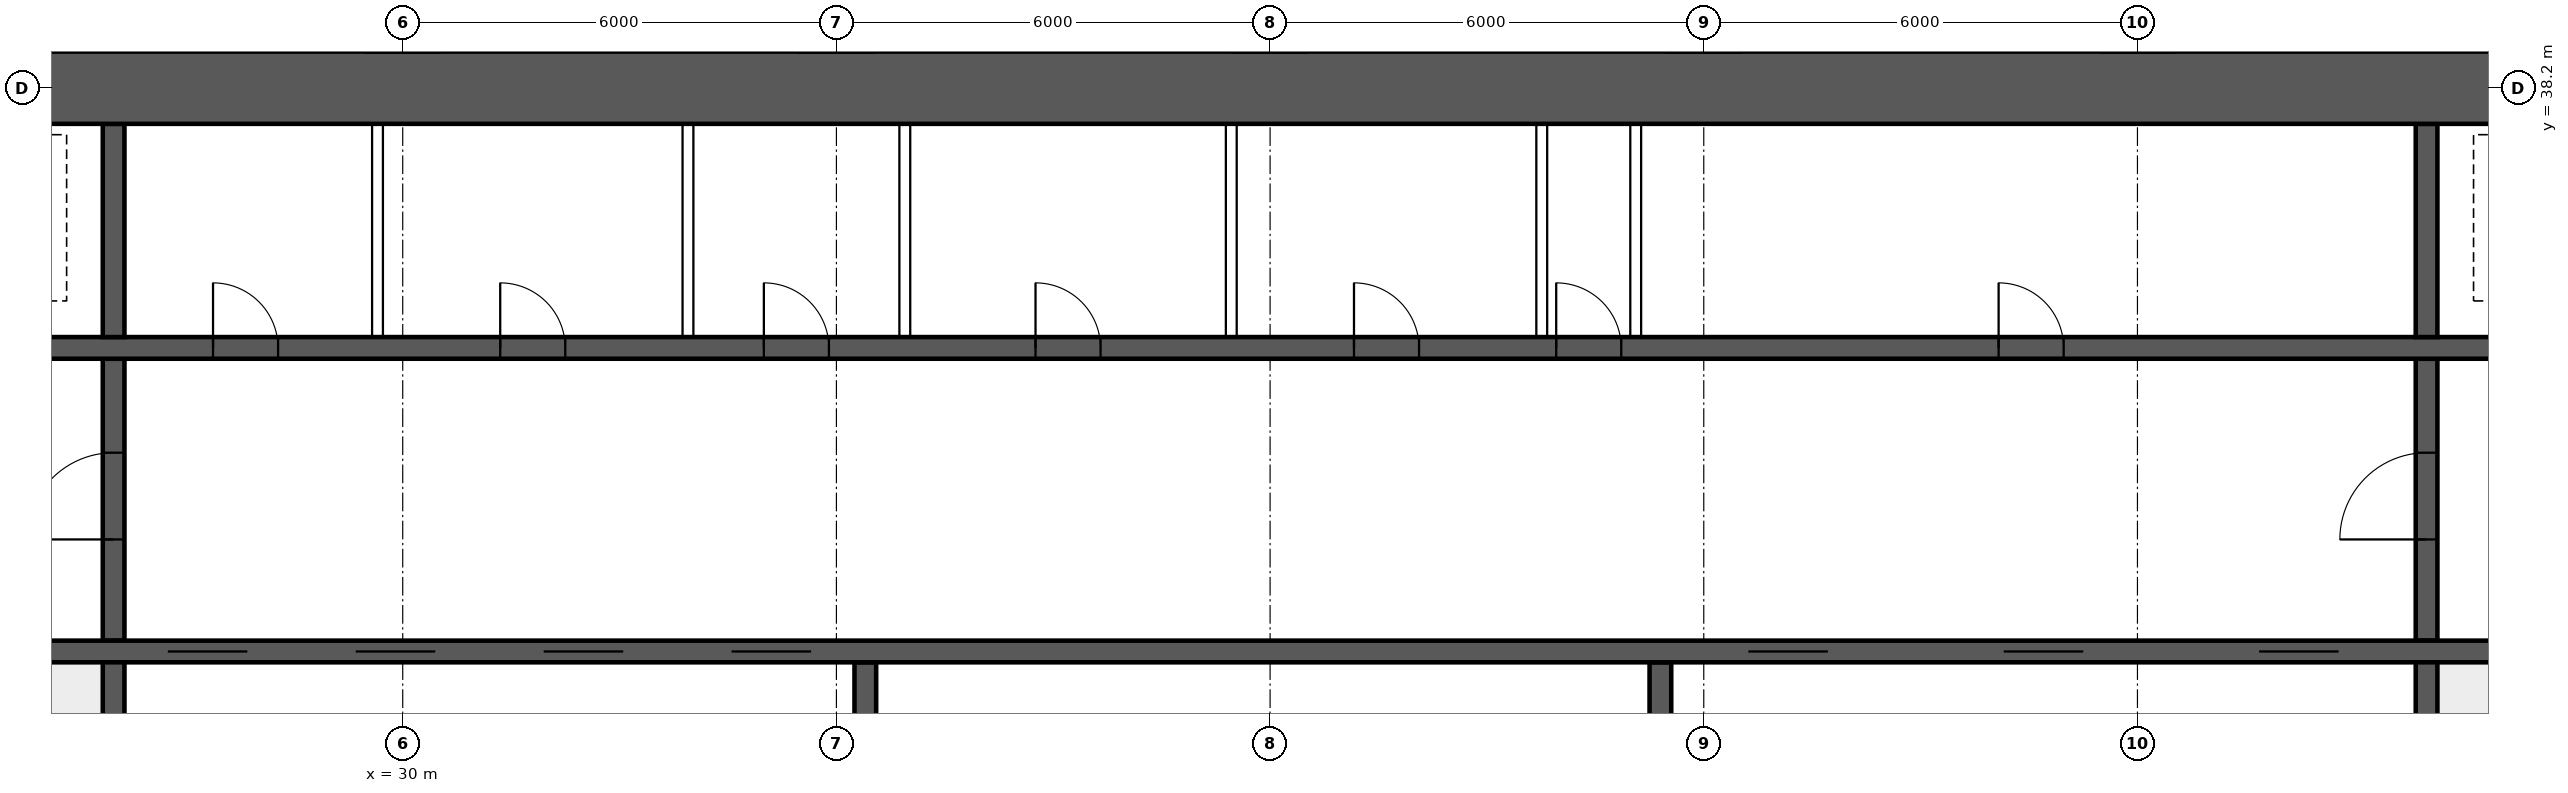
"""IFC4 building model, lengths in metres.
Left out: names, types, materials, properties, quantities, classifications, styles, units other than length and angle.
Written with IfcOpenShell. Run it as: python <this file> out.ifc"""

import sys

from ifc_helpers import new_model, si_unit, direction, frame, frame_2d, origin, place, context, subcontext, project, spatial, rectangle, extrude, element, fill, save


model = new_model("IFC4")
c1 = context("Model", 3, precision=1e-05, world=origin(), true_north=direction((0.0, 1.0)))
c2 = subcontext(c1, "Body", "Model", "MODEL_VIEW")
j1 = project(units=[si_unit("LENGTHUNIT", "METRE"), si_unit("PLANEANGLEUNIT", "RADIAN")], contexts=[c1])
p1 = place(None, origin())
s1 = spatial("IfcSite", under=j1, at=p1, CompositionType="ELEMENT")
p2 = place(p1, origin())
s2 = spatial("IfcBuilding", under=s1, at=p2, CompositionType="ELEMENT")
p3 = place(p2, frame((0.0, 0.0, 35.2)))
s3 = spatial("IfcBuildingStorey", under=s2, at=p3, CompositionType="ELEMENT", Elevation=35.2)
p4 = place(p3, frame((18.0, 38.2, 0.0), z_axis=(0.0, 0.0, 1.0), x_axis=(1.0, 0.0, 0.0)))
e1 = element("IfcWall", 1, at=p4, inside=s3, PredefinedType="SHEAR", context=c2, shape_type="SweptSolid", body=[
    extrude(rectangle(XDim=48.0, YDim=1.0, at=frame_2d((24.0, 0.0))), origin(), (0.0, 0.0, 1.0), 3.75),
])
p5 = place(p3, frame((18.5, 30.4, 0.0), z_axis=(0.0, 0.0, 1.0), x_axis=(1.0, 0.0, 0.0)))
e2 = element("IfcWall", 2, at=p5, inside=s3, PredefinedType="SHEAR", context=c2, shape_type="SweptSolid", body=[
    extrude(rectangle(XDim=47.0, YDim=0.3, at=frame_2d((23.5, 0.0))), origin(), (0.0, 0.0, 1.0), 3.75),
])
p6 = place(p5, frame((0.4, 0.0, 0.0)))
e3 = element("IfcOpeningElement", 3, at=p6, cuts=e2, PredefinedType="OPENING", context=c2, shape_type="SweptSolid", body=[
    extrude(rectangle(XDim=1.0, YDim=2.1, at=frame_2d((0.5, 1.05))), frame((0.0, 0.16, 0.0), z_axis=(0.0, -1.0, 0.0), x_axis=(1.0, 0.0, 0.0)), (0.0, 0.0, 1.0), 0.32),
])
p7 = place(p5, frame((45.6, 0.0, 0.0)))
e4 = element("IfcOpeningElement", 4, at=p7, cuts=e2, PredefinedType="OPENING", context=c2, shape_type="SweptSolid", body=[
    extrude(rectangle(XDim=1.0, YDim=2.1, at=frame_2d((0.5, 1.05))), frame((0.0, 0.16, 0.0), z_axis=(0.0, -1.0, 0.0), x_axis=(1.0, 0.0, 0.0)), (0.0, 0.0, 1.0), 0.32),
])
p8 = place(p5, frame((8.25, 0.0, 0.0)))
e5 = element("IfcOpeningElement", 5, at=p8, cuts=e2, PredefinedType="OPENING", context=c2, shape_type="SweptSolid", body=[
    extrude(rectangle(XDim=1.1, YDim=2.1, at=frame_2d((0.55, 1.05))), frame((0.0, 0.16, 0.0), z_axis=(0.0, -1.0, 0.0), x_axis=(1.0, 0.0, 0.0)), (0.0, 0.0, 1.0), 0.32),
])
p9 = place(p5, frame((10.85, 0.0, 0.0)))
e6 = element("IfcOpeningElement", 6, at=p9, cuts=e2, PredefinedType="OPENING", context=c2, shape_type="SweptSolid", body=[
    extrude(rectangle(XDim=1.1, YDim=2.1, at=frame_2d((0.55, 1.05))), frame((0.0, 0.16, 0.0), z_axis=(0.0, -1.0, 0.0), x_axis=(1.0, 0.0, 0.0)), (0.0, 0.0, 1.0), 0.32),
])
p10 = place(p5, frame((13.45, 0.0, 0.0)))
e7 = element("IfcOpeningElement", 7, at=p10, cuts=e2, PredefinedType="OPENING", context=c2, shape_type="SweptSolid", body=[
    extrude(rectangle(XDim=1.1, YDim=2.1, at=frame_2d((0.55, 1.05))), frame((0.0, 0.16, 0.0), z_axis=(0.0, -1.0, 0.0), x_axis=(1.0, 0.0, 0.0)), (0.0, 0.0, 1.0), 0.32),
])
p11 = place(p5, frame((16.05, 0.0, 0.0)))
e8 = element("IfcOpeningElement", 8, at=p11, cuts=e2, PredefinedType="OPENING", context=c2, shape_type="SweptSolid", body=[
    extrude(rectangle(XDim=1.1, YDim=2.1, at=frame_2d((0.55, 1.05))), frame((0.0, 0.16, 0.0), z_axis=(0.0, -1.0, 0.0), x_axis=(1.0, 0.0, 0.0)), (0.0, 0.0, 1.0), 0.32),
])
p12 = place(p5, frame((30.117, 0.0, 0.0)))
e9 = element("IfcOpeningElement", 9, at=p12, cuts=e2, PredefinedType="OPENING", context=c2, shape_type="SweptSolid", body=[
    extrude(rectangle(XDim=1.1, YDim=2.1, at=frame_2d((0.55, 1.05))), frame((0.0, 0.16, 0.0), z_axis=(0.0, -1.0, 0.0), x_axis=(1.0, 0.0, 0.0)), (0.0, 0.0, 1.0), 0.32),
])
p13 = place(p5, frame((33.65, 0.0, 0.0)))
e10 = element("IfcOpeningElement", 10, at=p13, cuts=e2, PredefinedType="OPENING", context=c2, shape_type="SweptSolid", body=[
    extrude(rectangle(XDim=1.1, YDim=2.1, at=frame_2d((0.55, 1.05))), frame((0.0, 0.16, 0.0), z_axis=(0.0, -1.0, 0.0), x_axis=(1.0, 0.0, 0.0)), (0.0, 0.0, 1.0), 0.32),
])
p14 = place(p5, frame((37.183, 0.0, 0.0)))
e11 = element("IfcOpeningElement", 11, at=p14, cuts=e2, PredefinedType="OPENING", context=c2, shape_type="SweptSolid", body=[
    extrude(rectangle(XDim=1.1, YDim=2.1, at=frame_2d((0.55, 1.05))), frame((0.0, 0.16, 0.0), z_axis=(0.0, -1.0, 0.0), x_axis=(1.0, 0.0, 0.0)), (0.0, 0.0, 1.0), 0.32),
])
p15 = place(p3, frame((18.5, 34.6, 0.0), z_axis=(0.0, 0.0, 1.0), x_axis=(1.0, 0.0, 0.0)))
e12 = element("IfcWall", 12, at=p15, inside=s3, PredefinedType="SHEAR", context=c2, shape_type="SweptSolid", body=[
    extrude(rectangle(XDim=47.0, YDim=0.3, at=frame_2d((23.5, 0.0))), origin(), (0.0, 0.0, 1.0), 3.75),
])
p16 = place(p15, frame((0.9, 0.0, 0.0)))
e13 = element("IfcOpeningElement", 13, at=p16, cuts=e12, PredefinedType="OPENING", context=c2, shape_type="SweptSolid", body=[
    extrude(rectangle(XDim=1.1, YDim=2.1, at=frame_2d((0.55, 1.05))), frame((0.0, 0.16, 0.0), z_axis=(0.0, -1.0, 0.0), x_axis=(1.0, 0.0, 0.0)), (0.0, 0.0, 1.0), 0.32),
])
p17 = place(p15, frame((45.0, 0.0, 0.0)))
e14 = element("IfcOpeningElement", 14, at=p17, cuts=e12, PredefinedType="OPENING", context=c2, shape_type="SweptSolid", body=[
    extrude(rectangle(XDim=1.1, YDim=2.1, at=frame_2d((0.55, 1.05))), frame((0.0, 0.16, 0.0), z_axis=(0.0, -1.0, 0.0), x_axis=(1.0, 0.0, 0.0)), (0.0, 0.0, 1.0), 0.32),
])
p18 = place(p15, frame((4.1, 0.0, 0.0)))
e15 = element("IfcOpeningElement", 15, at=p18, cuts=e12, PredefinedType="OPENING", context=c2, shape_type="SweptSolid", body=[
    extrude(rectangle(XDim=0.9, YDim=2.1, at=frame_2d((0.45, 1.05))), frame((0.0, 0.16, 0.0), z_axis=(0.0, -1.0, 0.0), x_axis=(1.0, 0.0, 0.0)), (0.0, 0.0, 1.0), 0.32),
])
p19 = place(p15, frame((42.0, 0.0, 0.0)))
e16 = element("IfcOpeningElement", 16, at=p19, cuts=e12, PredefinedType="OPENING", context=c2, shape_type="SweptSolid", body=[
    extrude(rectangle(XDim=0.9, YDim=2.1, at=frame_2d((0.45, 1.05))), frame((0.0, 0.16, 0.0), z_axis=(0.0, -1.0, 0.0), x_axis=(1.0, 0.0, 0.0)), (0.0, 0.0, 1.0), 0.32),
])
p20 = place(p15, frame((8.875, 0.0, 0.0)))
e17 = element("IfcOpeningElement", 17, at=p20, cuts=e12, PredefinedType="OPENING", context=c2, shape_type="SweptSolid", body=[
    extrude(rectangle(XDim=0.9, YDim=2.1, at=frame_2d((0.45, 1.05))), frame((0.0, 0.16, 0.0), z_axis=(0.0, -1.0, 0.0), x_axis=(1.0, 0.0, 0.0)), (0.0, 0.0, 1.0), 0.32),
])
p21 = place(p15, frame((12.849, 0.0, 0.0)))
e18 = element("IfcOpeningElement", 18, at=p21, cuts=e12, PredefinedType="OPENING", context=c2, shape_type="SweptSolid", body=[
    extrude(rectangle(XDim=0.9, YDim=2.1, at=frame_2d((0.45, 1.05))), frame((0.0, 0.16, 0.0), z_axis=(0.0, -1.0, 0.0), x_axis=(1.0, 0.0, 0.0)), (0.0, 0.0, 1.0), 0.32),
])
p22 = place(p15, frame((16.496, 0.0, 0.0)))
e19 = element("IfcOpeningElement", 19, at=p22, cuts=e12, PredefinedType="OPENING", context=c2, shape_type="SweptSolid", body=[
    extrude(rectangle(XDim=0.9, YDim=2.1, at=frame_2d((0.45, 1.05))), frame((0.0, 0.16, 0.0), z_axis=(0.0, -1.0, 0.0), x_axis=(1.0, 0.0, 0.0)), (0.0, 0.0, 1.0), 0.32),
])
p23 = place(p15, frame((20.255, 0.0, 0.0)))
e20 = element("IfcOpeningElement", 20, at=p23, cuts=e12, PredefinedType="OPENING", context=c2, shape_type="SweptSolid", body=[
    extrude(rectangle(XDim=0.9, YDim=2.1, at=frame_2d((0.45, 1.05))), frame((0.0, 0.16, 0.0), z_axis=(0.0, -1.0, 0.0), x_axis=(1.0, 0.0, 0.0)), (0.0, 0.0, 1.0), 0.32),
])
p24 = place(p15, frame((24.661, 0.0, 0.0)))
e21 = element("IfcOpeningElement", 21, at=p24, cuts=e12, PredefinedType="OPENING", context=c2, shape_type="SweptSolid", body=[
    extrude(rectangle(XDim=0.9, YDim=2.1, at=frame_2d((0.45, 1.05))), frame((0.0, 0.16, 0.0), z_axis=(0.0, -1.0, 0.0), x_axis=(1.0, 0.0, 0.0)), (0.0, 0.0, 1.0), 0.32),
])
p25 = place(p15, frame((27.458, 0.0, 0.0)))
e22 = element("IfcOpeningElement", 22, at=p25, cuts=e12, PredefinedType="OPENING", context=c2, shape_type="SweptSolid", body=[
    extrude(rectangle(XDim=0.9, YDim=2.1, at=frame_2d((0.45, 1.05))), frame((0.0, 0.16, 0.0), z_axis=(0.0, -1.0, 0.0), x_axis=(1.0, 0.0, 0.0)), (0.0, 0.0, 1.0), 0.32),
])
p26 = place(p15, frame((33.579, 0.0, 0.0)))
e23 = element("IfcOpeningElement", 23, at=p26, cuts=e12, PredefinedType="OPENING", context=c2, shape_type="SweptSolid", body=[
    extrude(rectangle(XDim=0.9, YDim=2.1, at=frame_2d((0.45, 1.05))), frame((0.0, 0.16, 0.0), z_axis=(0.0, -1.0, 0.0), x_axis=(1.0, 0.0, 0.0)), (0.0, 0.0, 1.0), 0.32),
])
for number, where, z_axis, x_axis in (
    (24, (26.0, 26.3, 0.0), (0.0, 0.0, 1.0), (0.0, 1.0, 0.0)),
    (25, (58.0, 26.3, 0.0), (0.0, 0.0, 1.0), (0.0, 1.0, 0.0)),
):
    element("IfcWall", number, at=place(p3, frame(where, z_axis=z_axis, x_axis=x_axis)), inside=s3, PredefinedType="SHEAR", context=c2, shape_type="SweptSolid", body=[
        extrude(rectangle(XDim=3.95, YDim=0.3, at=frame_2d((1.975, 0.0))), origin(), (0.0, 0.0, 1.0), 3.75),
    ])
p27 = place(p3, frame((26.0, 30.55, 0.0), z_axis=(0.0, 0.0, 1.0), x_axis=(0.0, 1.0, 0.0)))
e26 = element("IfcWall", 26, at=p27, inside=s3, PredefinedType="SHEAR", context=c2, shape_type="SweptSolid", body=[
    extrude(rectangle(XDim=3.9, YDim=0.3, at=frame_2d((1.95, 0.0))), origin(), (0.0, 0.0, 1.0), 3.75),
])
p28 = place(p27, frame((1.4, 0.0, 0.0)))
e27 = element("IfcOpeningElement", 27, at=p28, cuts=e26, PredefinedType="OPENING", context=c2, shape_type="SweptSolid", body=[
    extrude(rectangle(XDim=1.2, YDim=2.1, at=frame_2d((0.6, 1.05))), frame((0.0, 0.16, 0.0), z_axis=(0.0, -1.0, 0.0), x_axis=(1.0, 0.0, 0.0)), (0.0, 0.0, 1.0), 0.32),
])
p29 = place(p3, frame((58.0, 30.55, 0.0), z_axis=(0.0, 0.0, 1.0), x_axis=(0.0, 1.0, 0.0)))
e28 = element("IfcWall", 28, at=p29, inside=s3, PredefinedType="SHEAR", context=c2, shape_type="SweptSolid", body=[
    extrude(rectangle(XDim=3.9, YDim=0.3, at=frame_2d((1.95, 0.0))), origin(), (0.0, 0.0, 1.0), 3.75),
])
p30 = place(p29, frame((1.4, 0.0, 0.0)))
e29 = element("IfcOpeningElement", 29, at=p30, cuts=e28, PredefinedType="OPENING", context=c2, shape_type="SweptSolid", body=[
    extrude(rectangle(XDim=1.2, YDim=2.1, at=frame_2d((0.6, 1.05))), frame((0.0, 0.16, 0.0), z_axis=(0.0, -1.0, 0.0), x_axis=(1.0, 0.0, 0.0)), (0.0, 0.0, 1.0), 0.32),
])
for number, where, z_axis, x_axis in (
    (30, (26.0, 34.75, 0.0), (0.0, 0.0, 1.0), (0.0, 1.0, 0.0)),
    (31, (58.0, 34.75, 0.0), (0.0, 0.0, 1.0), (0.0, 1.0, 0.0)),
):
    element("IfcWall", number, at=place(p3, frame(where, z_axis=z_axis, x_axis=x_axis)), inside=s3, PredefinedType="SHEAR", context=c2, shape_type="SweptSolid", body=[
        extrude(rectangle(XDim=2.95, YDim=0.3, at=frame_2d((1.475, 0.0))), origin(), (0.0, 0.0, 1.0), 3.75),
    ])
for number, where, z_axis, x_axis in (
    (32, (36.4, 26.3, 0.0), (0.0, 0.0, 1.0), (0.0, 1.0, 0.0)),
    (33, (47.4, 26.3, 0.0), (0.0, 0.0, 1.0), (0.0, 1.0, 0.0)),
):
    element("IfcWall", number, at=place(p3, frame(where, z_axis=z_axis, x_axis=x_axis)), inside=s3, PredefinedType="SHEAR", context=c2, shape_type="SweptSolid", body=[
        extrude(rectangle(XDim=3.95, YDim=0.3, at=frame_2d((1.975, 0.0))), origin(), (0.0, 0.0, 1.0), 3.75),
    ])
for number, where, z_axis, x_axis in (
    (34, (29.651, 34.75, 0.0), (0.0, 0.0, 1.0), (0.0, 1.0, 0.0)),
    (35, (33.946, 34.75, 0.0), (0.0, 0.0, 1.0), (0.0, 1.0, 0.0)),
    (36, (36.946, 34.75, 0.0), (0.0, 0.0, 1.0), (0.0, 1.0, 0.0)),
    (37, (41.463, 34.75, 0.0), (0.0, 0.0, 1.0), (0.0, 1.0, 0.0)),
    (38, (45.758, 34.75, 0.0), (0.0, 0.0, 1.0), (0.0, 1.0, 0.0)),
    (39, (47.058, 34.75, 0.0), (0.0, 0.0, 1.0), (0.0, 1.0, 0.0)),
):
    element("IfcWall", number, at=place(p3, frame(where, z_axis=z_axis, x_axis=x_axis)), inside=s3, PredefinedType="SOLIDWALL", context=c2, shape_type="SweptSolid", body=[
        extrude(rectangle(XDim=2.95, YDim=0.15, at=frame_2d((1.475, 0.0))), origin(), (0.0, 0.0, 1.0), 3.3),
    ])
p31 = place(p28, origin())
e40 = element("IfcDoor", 40, at=p31, inside=s3, OperationType="SINGLE_SWING_LEFT", PredefinedType="DOOR", context=c2, shape_type="SweptSolid", body=[
    extrude(rectangle(XDim=1.2, YDim=2.1, at=frame_2d((0.6, 1.05))), frame((0.0, 0.025, 0.0), z_axis=(0.0, -1.0, 0.0), x_axis=(1.0, 0.0, 0.0)), (0.0, 0.0, 1.0), 0.05),
])
fill(e27, e40)
p32 = place(p30, origin())
e41 = element("IfcDoor", 41, at=p32, inside=s3, OperationType="SINGLE_SWING_LEFT", PredefinedType="DOOR", context=c2, shape_type="SweptSolid", body=[
    extrude(rectangle(XDim=1.2, YDim=2.1, at=frame_2d((0.6, 1.05))), frame((0.0, 0.025, 0.0), z_axis=(0.0, -1.0, 0.0), x_axis=(1.0, 0.0, 0.0)), (0.0, 0.0, 1.0), 0.05),
])
fill(e29, e41)
p33 = place(p20, origin())
e42 = element("IfcDoor", 42, at=p33, inside=s3, OperationType="SINGLE_SWING_LEFT", PredefinedType="DOOR", context=c2, shape_type="SweptSolid", body=[
    extrude(rectangle(XDim=0.9, YDim=2.1, at=frame_2d((0.45, 1.05))), frame((0.0, 0.025, 0.0), z_axis=(0.0, -1.0, 0.0), x_axis=(1.0, 0.0, 0.0)), (0.0, 0.0, 1.0), 0.05),
])
fill(e17, e42)
p34 = place(p21, origin())
e43 = element("IfcDoor", 43, at=p34, inside=s3, OperationType="SINGLE_SWING_LEFT", PredefinedType="DOOR", context=c2, shape_type="SweptSolid", body=[
    extrude(rectangle(XDim=0.9, YDim=2.1, at=frame_2d((0.45, 1.05))), frame((0.0, 0.025, 0.0), z_axis=(0.0, -1.0, 0.0), x_axis=(1.0, 0.0, 0.0)), (0.0, 0.0, 1.0), 0.05),
])
fill(e18, e43)
p35 = place(p22, origin())
e44 = element("IfcDoor", 44, at=p35, inside=s3, OperationType="SINGLE_SWING_LEFT", PredefinedType="DOOR", context=c2, shape_type="SweptSolid", body=[
    extrude(rectangle(XDim=0.9, YDim=2.1, at=frame_2d((0.45, 1.05))), frame((0.0, 0.025, 0.0), z_axis=(0.0, -1.0, 0.0), x_axis=(1.0, 0.0, 0.0)), (0.0, 0.0, 1.0), 0.05),
])
fill(e19, e44)
p36 = place(p23, origin())
e45 = element("IfcDoor", 45, at=p36, inside=s3, OperationType="SINGLE_SWING_LEFT", PredefinedType="DOOR", context=c2, shape_type="SweptSolid", body=[
    extrude(rectangle(XDim=0.9, YDim=2.1, at=frame_2d((0.45, 1.05))), frame((0.0, 0.025, 0.0), z_axis=(0.0, -1.0, 0.0), x_axis=(1.0, 0.0, 0.0)), (0.0, 0.0, 1.0), 0.05),
])
fill(e20, e45)
p37 = place(p24, origin())
e46 = element("IfcDoor", 46, at=p37, inside=s3, OperationType="SINGLE_SWING_LEFT", PredefinedType="DOOR", context=c2, shape_type="SweptSolid", body=[
    extrude(rectangle(XDim=0.9, YDim=2.1, at=frame_2d((0.45, 1.05))), frame((0.0, 0.025, 0.0), z_axis=(0.0, -1.0, 0.0), x_axis=(1.0, 0.0, 0.0)), (0.0, 0.0, 1.0), 0.05),
])
fill(e21, e46)
p38 = place(p25, origin())
e47 = element("IfcDoor", 47, at=p38, inside=s3, OperationType="SINGLE_SWING_LEFT", PredefinedType="DOOR", context=c2, shape_type="SweptSolid", body=[
    extrude(rectangle(XDim=0.9, YDim=2.1, at=frame_2d((0.45, 1.05))), frame((0.0, 0.025, 0.0), z_axis=(0.0, -1.0, 0.0), x_axis=(1.0, 0.0, 0.0)), (0.0, 0.0, 1.0), 0.05),
])
fill(e22, e47)
p39 = place(p26, origin())
e48 = element("IfcDoor", 48, at=p39, inside=s3, OperationType="SINGLE_SWING_LEFT", PredefinedType="DOOR", context=c2, shape_type="SweptSolid", body=[
    extrude(rectangle(XDim=0.9, YDim=2.1, at=frame_2d((0.45, 1.05))), frame((0.0, 0.025, 0.0), z_axis=(0.0, -1.0, 0.0), x_axis=(1.0, 0.0, 0.0)), (0.0, 0.0, 1.0), 0.05),
])
fill(e23, e48)
p40 = place(p8, origin())
e49 = element("IfcDoor", 49, at=p40, inside=s3, OperationType="DOUBLE_DOOR_SLIDING", PredefinedType="DOOR", context=c2, shape_type="SweptSolid", body=[
    extrude(rectangle(XDim=1.1, YDim=2.1, at=frame_2d((0.55, 1.05))), frame((0.0, 0.025, 0.0), z_axis=(0.0, -1.0, 0.0), x_axis=(1.0, 0.0, 0.0)), (0.0, 0.0, 1.0), 0.05),
])
fill(e5, e49)
p41 = place(p9, origin())
e50 = element("IfcDoor", 50, at=p41, inside=s3, OperationType="DOUBLE_DOOR_SLIDING", PredefinedType="DOOR", context=c2, shape_type="SweptSolid", body=[
    extrude(rectangle(XDim=1.1, YDim=2.1, at=frame_2d((0.55, 1.05))), frame((0.0, 0.025, 0.0), z_axis=(0.0, -1.0, 0.0), x_axis=(1.0, 0.0, 0.0)), (0.0, 0.0, 1.0), 0.05),
])
fill(e6, e50)
p42 = place(p10, origin())
e51 = element("IfcDoor", 51, at=p42, inside=s3, OperationType="DOUBLE_DOOR_SLIDING", PredefinedType="DOOR", context=c2, shape_type="SweptSolid", body=[
    extrude(rectangle(XDim=1.1, YDim=2.1, at=frame_2d((0.55, 1.05))), frame((0.0, 0.025, 0.0), z_axis=(0.0, -1.0, 0.0), x_axis=(1.0, 0.0, 0.0)), (0.0, 0.0, 1.0), 0.05),
])
fill(e7, e51)
p43 = place(p11, origin())
e52 = element("IfcDoor", 52, at=p43, inside=s3, OperationType="DOUBLE_DOOR_SLIDING", PredefinedType="DOOR", context=c2, shape_type="SweptSolid", body=[
    extrude(rectangle(XDim=1.1, YDim=2.1, at=frame_2d((0.55, 1.05))), frame((0.0, 0.025, 0.0), z_axis=(0.0, -1.0, 0.0), x_axis=(1.0, 0.0, 0.0)), (0.0, 0.0, 1.0), 0.05),
])
fill(e8, e52)
p44 = place(p12, origin())
e53 = element("IfcDoor", 53, at=p44, inside=s3, OperationType="DOUBLE_DOOR_SLIDING", PredefinedType="DOOR", context=c2, shape_type="SweptSolid", body=[
    extrude(rectangle(XDim=1.1, YDim=2.1, at=frame_2d((0.55, 1.05))), frame((0.0, 0.025, 0.0), z_axis=(0.0, -1.0, 0.0), x_axis=(1.0, 0.0, 0.0)), (0.0, 0.0, 1.0), 0.05),
])
fill(e9, e53)
p45 = place(p13, origin())
e54 = element("IfcDoor", 54, at=p45, inside=s3, OperationType="DOUBLE_DOOR_SLIDING", PredefinedType="DOOR", context=c2, shape_type="SweptSolid", body=[
    extrude(rectangle(XDim=1.1, YDim=2.1, at=frame_2d((0.55, 1.05))), frame((0.0, 0.025, 0.0), z_axis=(0.0, -1.0, 0.0), x_axis=(1.0, 0.0, 0.0)), (0.0, 0.0, 1.0), 0.05),
])
fill(e10, e54)
p46 = place(p14, origin())
e55 = element("IfcDoor", 55, at=p46, inside=s3, OperationType="DOUBLE_DOOR_SLIDING", PredefinedType="DOOR", context=c2, shape_type="SweptSolid", body=[
    extrude(rectangle(XDim=1.1, YDim=2.1, at=frame_2d((0.55, 1.05))), frame((0.0, 0.025, 0.0), z_axis=(0.0, -1.0, 0.0), x_axis=(1.0, 0.0, 0.0)), (0.0, 0.0, 1.0), 0.05),
])
fill(e11, e55)
save(model, sys.argv[1])
